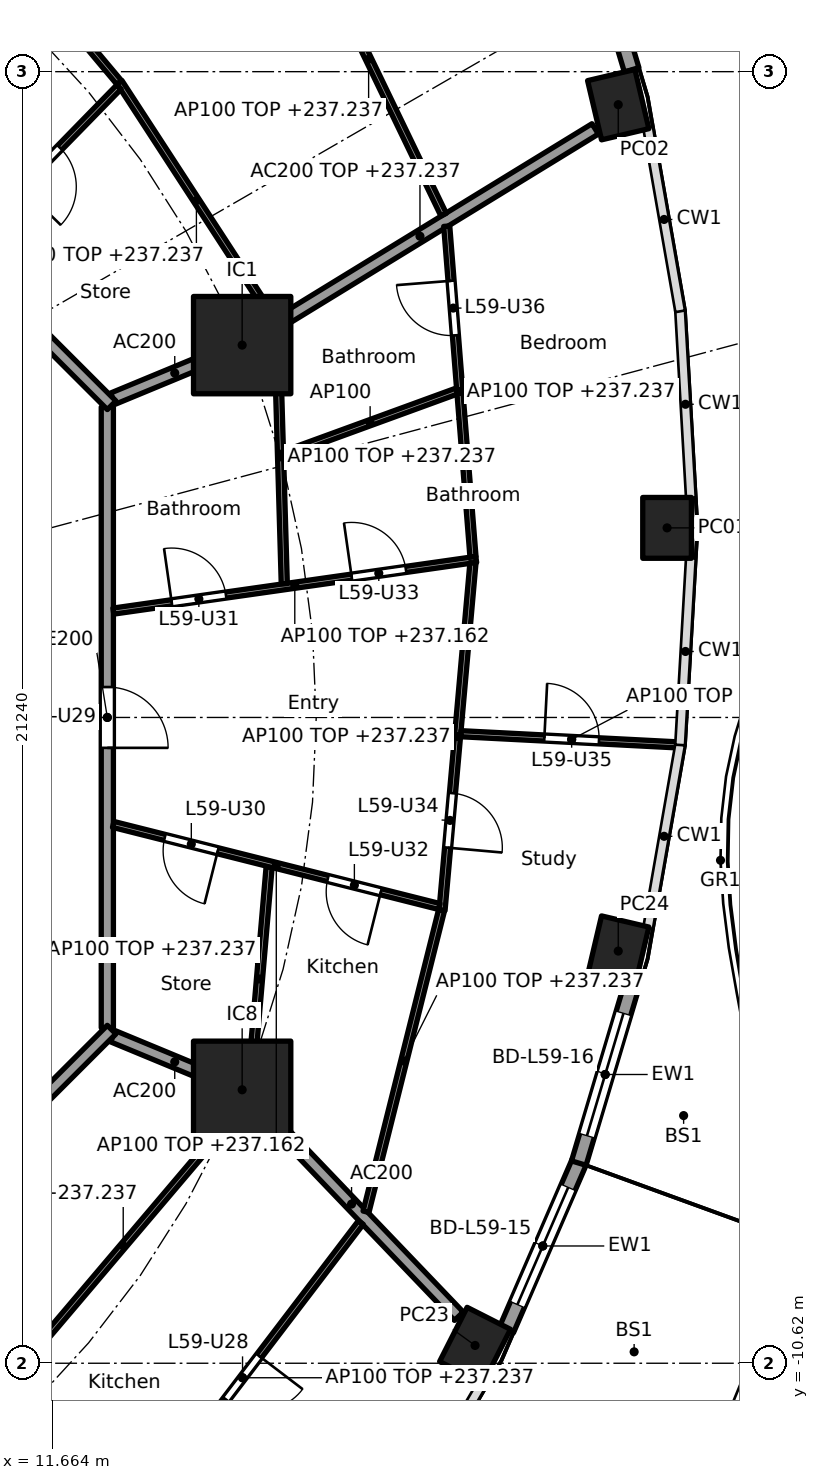
"""IFC4 building model, lengths in metres.
Left out: names, types, materials, properties, quantities, classifications, styles, units other than length and angle.
Written with IfcOpenShell. Run it as: python <this file> out.ifc"""

import sys

from ifc_helpers import new_model, si_unit, direction, frame, frame_2d, origin, origin_2d, place, context, subcontext, project, spatial, rectangle, hollow_rectangle, extrude, element, fill, save


model = new_model("IFC4")
c1 = context("Model", 3, precision=1e-05, world=origin(), true_north=direction((0.0, 1.0)))
c2 = subcontext(c1, "Body", "Model", "MODEL_VIEW")
j1 = project(units=[si_unit("LENGTHUNIT", "METRE"), si_unit("PLANEANGLEUNIT", "RADIAN")], contexts=[c1])
p1 = place(None, origin())
s1 = spatial("IfcSite", under=j1, at=p1, CompositionType="ELEMENT")
p2 = place(p1, origin())
s2 = spatial("IfcBuilding", under=s1, at=p2, CompositionType="ELEMENT")
p3 = place(p2, frame((0.0, 0.0, 234.4)))
s3 = spatial("IfcBuildingStorey", under=s2, at=p3, CompositionType="ELEMENT", Elevation=234.4)
for number, where, z_axis, x_axis in (
    (1, (21.77, 3.118, 0.0), (0.0, 0.0, 1.0), (0.0, 1.0, 0.0)),
    (2, (20.967, 10.077, 0.0), (0.0, 0.0, 1.0), (-0.229, 0.973, 0.0)),
    (3, (18.612, -10.327, 0.0), (0.0, 0.0, 1.0), (0.452, 0.892, 0.0)),
    (4, (20.967, -3.842, 0.0), (0.0, 0.0, 1.0), (0.229, 0.973, 0.0)),
):
    element("IfcColumn", number, at=place(p3, frame(where, z_axis=z_axis, x_axis=x_axis)), inside=s3, PredefinedType="COLUMN", context=c2, shape_type="SweptSolid", body=[
        extrude(hollow_rectangle(XDim=1.0, YDim=0.8, WallThickness=0.032, at=origin_2d()), origin(), (0.0, 0.0, 1.0), 3.7),
    ])
for number, where, z_axis, x_axis in (
    (5, (14.782, 6.123, 0.0), (0.0, 0.0, 1.0), (1.0, 0.0, 0.0)),
    (6, (14.782, -6.123, 0.0), (0.0, 0.0, 1.0), (1.0, 0.0, 0.0)),
):
    element("IfcColumn", number, at=place(p3, frame(where, z_axis=z_axis, x_axis=x_axis)), inside=s3, PredefinedType="COLUMN", context=c2, shape_type="SweptSolid", body=[
        extrude(rectangle(XDim=1.6, YDim=1.6, at=origin_2d()), origin(), (0.0, 0.0, 1.0), 3.7),
    ])
p4 = place(p3, frame((20.318, 13.564, 0.0), z_axis=(0.0, 0.0, 1.0), x_axis=(0.285785716255, -0.958293548128, 0.0)))
e7 = element("IfcWall", 7, at=p4, inside=s3, PredefinedType="SOLIDWALL", context=c2, shape_type="SweptSolid", body=[
    extrude(rectangle(XDim=3.04, YDim=0.25, at=frame_2d((1.52, 0.0))), origin(), (0.0, 0.0, 1.0), 3.44),
])
p5 = place(p4, frame((0.47, 0.0, 0.0)))
e8 = element("IfcOpeningElement", 8, at=p5, cuts=e7, PredefinedType="OPENING", context=c2, shape_type="SweptSolid", body=[
    extrude(rectangle(XDim=2.1, YDim=2.4, at=frame_2d((1.05, 1.2))), frame((0.0, 0.135, 0.0), z_axis=(0.0, -1.0, 0.0), x_axis=(1.0, 0.0, 0.0)), (0.0, 0.0, 1.0), 0.27),
])
p6 = place(p3, frame((20.323, -7.314, 0.0), z_axis=(0.0, 0.0, 1.0), x_axis=(-0.397586897646, -0.917564525698, 0.0)))
e9 = element("IfcWall", 9, at=p6, inside=s3, PredefinedType="SOLIDWALL", context=c2, shape_type="SweptSolid", body=[
    extrude(rectangle(XDim=3.002, YDim=0.25, at=frame_2d((1.501, 0.0))), origin(), (0.0, 0.0, 1.0), 3.44),
])
p7 = place(p6, frame((0.451, 0.0, 0.0)))
e10 = element("IfcOpeningElement", 10, at=p7, cuts=e9, PredefinedType="OPENING", context=c2, shape_type="SweptSolid", body=[
    extrude(rectangle(XDim=2.1, YDim=2.4, at=frame_2d((1.05, 1.2))), frame((0.0, 0.135, 0.0), z_axis=(0.0, -1.0, 0.0), x_axis=(1.0, 0.0, 0.0)), (0.0, 0.0, 1.0), 0.27),
])
p8 = place(p3, frame((21.187, -4.415, 0.0), z_axis=(0.0, 0.0, 1.0), x_axis=(-0.285785716255, -0.958293548128, 0.0)))
e11 = element("IfcWall", 11, at=p8, inside=s3, PredefinedType="SOLIDWALL", context=c2, shape_type="SweptSolid", body=[
    extrude(rectangle(XDim=3.04, YDim=0.25, at=frame_2d((1.52, 0.0))), origin(), (0.0, 0.0, 1.0), 3.44),
])
p9 = place(p8, frame((0.47, 0.0, 0.0)))
e12 = element("IfcOpeningElement", 12, at=p9, cuts=e11, PredefinedType="OPENING", context=c2, shape_type="SweptSolid", body=[
    extrude(rectangle(XDim=2.1, YDim=2.4, at=frame_2d((1.05, 1.2))), frame((0.0, 0.135, 0.0), z_axis=(0.0, -1.0, 0.0), x_axis=(1.0, 0.0, 0.0)), (0.0, 0.0, 1.0), 0.27),
])
p10 = place(p3, frame((12.657, 5.243, 0.0), z_axis=(0.0, 0.0, 1.0), x_axis=(0.92383017907, 0.382802560388, 0.0)))
e13 = element("IfcWall", 13, at=p10, inside=s3, PredefinedType="PARTITIONING", context=c2, shape_type="SweptSolid", body=[
    extrude(rectangle(XDim=2.2, YDim=0.2, at=frame_2d((1.1, 0.0))), origin(), (0.0, 0.0, 1.0), 3.44),
])
p11 = place(p3, frame((14.825, 6.149, 0.0), z_axis=(0.0, 0.0, 1.0), x_axis=(0.852781365284, 0.522268075824, 0.0)))
e14 = element("IfcWall", 14, at=p11, inside=s3, PredefinedType="PARTITIONING", context=c2, shape_type="SweptSolid", body=[
    extrude(rectangle(XDim=6.758, YDim=0.2, at=frame_2d((3.379, 0.0))), origin(), (0.0, 0.0, 1.0), 2.837),
])
p12 = place(p3, frame((12.657, -5.243, 0.0), z_axis=(0.0, 0.0, 1.0), x_axis=(0.923853160736, -0.382747093259, 0.0)))
e15 = element("IfcWall", 15, at=p12, inside=s3, PredefinedType="PARTITIONING", context=c2, shape_type="SweptSolid", body=[
    extrude(rectangle(XDim=2.2, YDim=0.2, at=frame_2d((1.1, 0.0))), origin(), (0.0, 0.0, 1.0), 3.44),
])
p13 = place(p3, frame((14.817, -6.159, 0.0), z_axis=(0.0, 0.0, 1.0), x_axis=(0.691437669875, -0.722436120828, 0.0)))
e16 = element("IfcWall", 16, at=p13, inside=s3, PredefinedType="PARTITIONING", context=c2, shape_type="SweptSolid", body=[
    extrude(rectangle(XDim=5.104, YDim=0.2, at=frame_2d((2.552, 0.0))), origin(), (0.0, 0.0, 1.0), 3.44),
])
p14 = place(p3, frame((12.565, -5.104, 0.0), z_axis=(0.0, 0.0, 1.0), x_axis=(0.0, 1.0, 0.0)))
e17 = element("IfcWall", 17, at=p14, inside=s3, PredefinedType="PARTITIONING", context=c2, shape_type="SweptSolid", body=[
    extrude(rectangle(XDim=10.209, YDim=0.2, at=frame_2d((5.104, 0.0))), origin(), (0.0, 0.0, 1.0), 3.44),
])
p15 = place(p14, frame((4.604, 0.0, 0.0)))
e18 = element("IfcOpeningElement", 18, at=p15, cuts=e17, PredefinedType="OPENING", context=c2, shape_type="SweptSolid", body=[
    extrude(rectangle(XDim=1.0, YDim=2.1, at=frame_2d((0.5, 1.05))), frame((0.0, 0.11, 0.0), z_axis=(0.0, -1.0, 0.0), x_axis=(1.0, 0.0, 0.0)), (0.0, 0.0, 1.0), 0.22),
])
p16 = place(p3, frame((12.635, 5.134, 0.0), z_axis=(0.0, 0.0, 1.0), x_axis=(-0.707106781187, 0.707106781187, 0.0)))
e19 = element("IfcWall", 19, at=p16, inside=s3, PredefinedType="PARTITIONING", context=c2, shape_type="SweptSolid", body=[
    extrude(rectangle(XDim=10.609, YDim=0.2, at=frame_2d((5.305, 0.0))), origin(), (0.0, 0.0, 1.0), 3.44),
])
p17 = place(p3, frame((5.275, -12.494, 0.0), z_axis=(0.0, 0.0, 1.0), x_axis=(0.707106781187, 0.707106781187, 0.0)))
e20 = element("IfcWall", 20, at=p17, inside=s3, PredefinedType="PARTITIONING", context=c2, shape_type="SweptSolid", body=[
    extrude(rectangle(XDim=10.409, YDim=0.2, at=frame_2d((5.205, 0.0))), origin(), (0.0, 0.0, 1.0), 3.44),
])
p18 = place(p17, frame((3.303, 0.0, 0.0)))
e21 = element("IfcOpeningElement", 21, at=p18, cuts=e20, PredefinedType="OPENING", context=c2, shape_type="SweptSolid", body=[
    extrude(rectangle(XDim=1.0, YDim=2.1, at=frame_2d((0.5, 1.05))), frame((0.0, 0.11, 0.0), z_axis=(0.0, -1.0, 0.0), x_axis=(1.0, 0.0, 0.0)), (0.0, 0.0, 1.0), 0.22),
])
p19 = place(p3, frame((12.664, 1.749, 0.0), z_axis=(0.0, 0.0, 1.0), x_axis=(0.990000460163, 0.141064130369, 0.0)))
e22 = element("IfcWall", 22, at=p19, inside=s3, PredefinedType="PARTITIONING", context=c2, shape_type="SweptSolid", body=[
    extrude(rectangle(XDim=6.028, YDim=0.1, at=frame_2d((3.014, 0.0))), origin(), (0.0, 0.0, 1.0), 2.762),
])
p20 = place(p19, frame((0.97, 0.0, 0.0)))
e23 = element("IfcOpeningElement", 23, at=p20, cuts=e22, PredefinedType="OPENING", context=c2, shape_type="SweptSolid", body=[
    extrude(rectangle(XDim=0.9, YDim=2.1, at=frame_2d((0.45, 1.05))), frame((0.0, 0.06, 0.0), z_axis=(0.0, -1.0, 0.0), x_axis=(1.0, 0.0, 0.0)), (0.0, 0.0, 1.0), 0.12),
])
p21 = place(p19, frame((3.959, 0.0, 0.0)))
e24 = element("IfcOpeningElement", 24, at=p21, cuts=e22, PredefinedType="OPENING", context=c2, shape_type="SweptSolid", body=[
    extrude(rectangle(XDim=0.9, YDim=2.1, at=frame_2d((0.45, 1.05))), frame((0.0, 0.06, 0.0), z_axis=(0.0, -1.0, 0.0), x_axis=(1.0, 0.0, 0.0)), (0.0, 0.0, 1.0), 0.12),
])
p22 = place(p3, frame((15.475, 2.2, 0.0), z_axis=(0.0, 0.0, 1.0), x_axis=(-0.029254623973, 0.999571991893, 0.0)))
e25 = element("IfcWall", 25, at=p22, inside=s3, PredefinedType="PARTITIONING", context=c2, shape_type="SweptSolid", body=[
    extrude(rectangle(XDim=4.173, YDim=0.1, at=frame_2d((2.086, 0.0))), origin(), (0.0, 0.0, 1.0), 2.837),
])
p23 = place(p3, frame((18.578, 2.642, 0.0), z_axis=(0.0, 0.0, 1.0), x_axis=(-0.079188322924, 0.996859673932, 0.0)))
e26 = element("IfcWall", 26, at=p23, inside=s3, PredefinedType="PARTITIONING", context=c2, shape_type="SweptSolid", body=[
    extrude(rectangle(XDim=5.454, YDim=0.1, at=frame_2d((2.727, 0.0))), origin(), (0.0, 0.0, 1.0), 2.837),
])
p24 = place(p23, frame((3.653, 0.0, 0.0)))
e27 = element("IfcOpeningElement", 27, at=p24, cuts=e26, PredefinedType="OPENING", context=c2, shape_type="SweptSolid", body=[
    extrude(rectangle(XDim=0.9, YDim=2.1, at=frame_2d((0.45, 1.05))), frame((0.0, 0.06, 0.0), z_axis=(0.0, -1.0, 0.0), x_axis=(1.0, 0.0, 0.0)), (0.0, 0.0, 1.0), 0.12),
])
p25 = place(p3, frame((18.578, 2.542, 0.0), z_axis=(0.0, 0.0, 1.0), x_axis=(-0.088651453697, -0.996062708748, 0.0)))
e28 = element("IfcWall", 28, at=p25, inside=s3, PredefinedType="PARTITIONING", context=c2, shape_type="SweptSolid", body=[
    extrude(rectangle(XDim=5.737, YDim=0.1, at=frame_2d((2.868, 0.0))), origin(), (0.0, 0.0, 1.0), 2.837),
])
p26 = place(p25, frame((3.802, 0.0, 0.0)))
e29 = element("IfcOpeningElement", 29, at=p26, cuts=e28, PredefinedType="OPENING", context=c2, shape_type="SweptSolid", body=[
    extrude(rectangle(XDim=0.9, YDim=2.1, at=frame_2d((0.45, 1.05))), frame((0.0, 0.06, 0.0), z_axis=(0.0, -1.0, 0.0), x_axis=(1.0, 0.0, 0.0)), (0.0, 0.0, 1.0), 0.12),
])
p27 = place(p3, frame((15.46, 4.327, 0.0), z_axis=(0.0, 0.0, 1.0), x_axis=(0.939452643938, 0.342678755977, 0.0)))
e30 = element("IfcWall", 30, at=p27, inside=s3, PredefinedType="PARTITIONING", context=c2, shape_type="SweptSolid", body=[
    extrude(rectangle(XDim=3.037, YDim=0.1, at=frame_2d((1.519, 0.0))), origin(), (0.0, 0.0, 1.0), 3.44),
])
p28 = place(p3, frame((15.295, 6.554, 0.0), z_axis=(0.0, 0.0, 1.0), x_axis=(-0.545186120363, 0.838315032767, 0.0)))
e31 = element("IfcWall", 31, at=p28, inside=s3, PredefinedType="PARTITIONING", context=c2, shape_type="SweptSolid", body=[
    extrude(rectangle(XDim=4.643, YDim=0.1, at=frame_2d((2.321, 0.0))), origin(), (0.0, 0.0, 1.0), 2.837),
])
p29 = place(p3, frame((18.095, 8.269, 0.0), z_axis=(0.0, 0.0, 1.0), x_axis=(-0.434640773561, 0.900603907363, 0.0)))
e32 = element("IfcWall", 32, at=p29, inside=s3, PredefinedType="PARTITIONING", context=c2, shape_type="SweptSolid", body=[
    extrude(rectangle(XDim=5.674, YDim=0.1, at=frame_2d((2.837, 0.0))), origin(), (0.0, 0.0, 1.0), 2.837),
])
p30 = place(p3, frame((10.181, 7.729, 0.0), z_axis=(0.0, 0.0, 1.0), x_axis=(0.69841402561, 0.71569396311, 0.0)))
e33 = element("IfcWall", 33, at=p30, inside=s3, PredefinedType="PARTITIONING", context=c2, shape_type="SweptSolid", body=[
    extrude(rectangle(XDim=3.688, YDim=0.1, at=frame_2d((1.844, 0.0))), origin(), (0.0, 0.0, 1.0), 2.762),
])
p31 = place(p30, frame((1.394, 0.0, 0.0)))
e34 = element("IfcOpeningElement", 34, at=p31, cuts=e33, PredefinedType="OPENING", context=c2, shape_type="SweptSolid", body=[
    extrude(rectangle(XDim=0.9, YDim=2.1, at=frame_2d((0.45, 1.05))), frame((0.0, 0.06, 0.0), z_axis=(0.0, -1.0, 0.0), x_axis=(1.0, 0.0, 0.0)), (0.0, 0.0, 1.0), 0.12),
])
p32 = place(p3, frame((12.759, 10.443, 0.0), z_axis=(0.0, 0.0, 1.0), x_axis=(-0.642225196965, 0.766516011825, 0.0)))
e35 = element("IfcWall", 35, at=p32, inside=s3, PredefinedType="PARTITIONING", context=c2, shape_type="SweptSolid", body=[
    extrude(rectangle(XDim=4.361, YDim=0.1, at=frame_2d((2.18, 0.0))), origin(), (0.0, 0.0, 1.0), 2.837),
])
p33 = place(p3, frame((8.95, -8.96, 0.0), z_axis=(0.0, 0.0, 1.0), x_axis=(0.652102165991, -0.758131100213, 0.0)))
e36 = element("IfcWall", 36, at=p33, inside=s3, PredefinedType="PARTITIONING", context=c2, shape_type="SweptSolid", body=[
    extrude(rectangle(XDim=8.568, YDim=0.1, at=frame_2d((4.284, 0.0))), origin(), (0.0, 0.0, 1.0), 2.762),
])
p34 = place(p33, frame((0.957, 0.0, 0.0)))
e37 = element("IfcOpeningElement", 37, at=p34, cuts=e36, PredefinedType="OPENING", context=c2, shape_type="SweptSolid", body=[
    extrude(rectangle(XDim=0.9, YDim=2.1, at=frame_2d((0.45, 1.05))), frame((0.0, 0.06, 0.0), z_axis=(0.0, -1.0, 0.0), x_axis=(1.0, 0.0, 0.0)), (0.0, 0.0, 1.0), 0.12),
])
p35 = place(p33, frame((3.919, 0.0, 0.0)))
e38 = element("IfcOpeningElement", 38, at=p35, cuts=e36, PredefinedType="OPENING", context=c2, shape_type="SweptSolid", body=[
    extrude(rectangle(XDim=0.9, YDim=2.1, at=frame_2d((0.45, 1.05))), frame((0.0, 0.06, 0.0), z_axis=(0.0, -1.0, 0.0), x_axis=(1.0, 0.0, 0.0)), (0.0, 0.0, 1.0), 0.12),
])
p36 = place(p3, frame((10.818, -11.056, 0.0), z_axis=(0.0, 0.0, 1.0), x_axis=(0.646981604878, 0.762505608471, 0.0)))
e39 = element("IfcWall", 39, at=p36, inside=s3, PredefinedType="PARTITIONING", context=c2, shape_type="SweptSolid", body=[
    extrude(rectangle(XDim=6.209, YDim=0.1, at=frame_2d((3.104, 0.0))), origin(), (0.0, 0.0, 1.0), 2.837),
])
p37 = place(p3, frame((12.843, -13.411, 0.0), z_axis=(0.0, 0.0, 1.0), x_axis=(0.606128002625, 0.795367112995, 0.0)))
e40 = element("IfcWall", 40, at=p37, inside=s3, PredefinedType="PARTITIONING", context=c2, shape_type="SweptSolid", body=[
    extrude(rectangle(XDim=6.42, YDim=0.1, at=frame_2d((3.21, 0.0))), origin(), (0.0, 0.0, 1.0), 2.837),
])
p38 = place(p37, frame((2.76, 0.0, 0.0)))
e41 = element("IfcOpeningElement", 41, at=p38, cuts=e40, PredefinedType="OPENING", context=c2, shape_type="SweptSolid", body=[
    extrude(rectangle(XDim=0.9, YDim=2.1, at=frame_2d((0.45, 1.05))), frame((0.0, 0.06, 0.0), z_axis=(0.0, -1.0, 0.0), x_axis=(1.0, 0.0, 0.0)), (0.0, 0.0, 1.0), 0.12),
])
p39 = place(p3, frame((14.908, -6.146, 0.0), z_axis=(0.0, 0.0, 1.0), x_axis=(0.085881574106, 0.996305352404, 0.0)))
e42 = element("IfcWall", 42, at=p39, inside=s3, PredefinedType="PARTITIONING", context=c2, shape_type="SweptSolid", body=[
    extrude(rectangle(XDim=3.704, YDim=0.1, at=frame_2d((1.852, 0.0))), origin(), (0.0, 0.0, 1.0), 2.837),
])
p40 = place(p3, frame((16.819, -8.129, 0.0), z_axis=(0.0, 0.0, 1.0), x_axis=(0.243041266705, 0.970015949703, 0.0)))
e43 = element("IfcWall", 43, at=p40, inside=s3, PredefinedType="PARTITIONING", context=c2, shape_type="SweptSolid", body=[
    extrude(rectangle(XDim=5.112, YDim=0.1, at=frame_2d((2.556, 0.0))), origin(), (0.0, 0.0, 1.0), 2.837),
])
p41 = place(p3, frame((12.662, -1.759, 0.0), z_axis=(0.0, 0.0, 1.0), x_axis=(0.969746519828, -0.24411408661, 0.0)))
e44 = element("IfcWall", 44, at=p41, inside=s3, PredefinedType="PARTITIONING", context=c2, shape_type="SweptSolid", body=[
    extrude(rectangle(XDim=5.531, YDim=0.1, at=frame_2d((2.765, 0.0))), origin(), (0.0, 0.0, 1.0), 2.762),
])
p42 = place(p41, frame((0.874, 0.0, 0.0)))
e45 = element("IfcOpeningElement", 45, at=p42, cuts=e44, PredefinedType="OPENING", context=c2, shape_type="SweptSolid", body=[
    extrude(rectangle(XDim=0.9, YDim=2.1, at=frame_2d((0.45, 1.05))), frame((0.0, 0.06, 0.0), z_axis=(0.0, -1.0, 0.0), x_axis=(1.0, 0.0, 0.0)), (0.0, 0.0, 1.0), 0.12),
])
p43 = place(p41, frame((3.64, 0.0, 0.0)))
e46 = element("IfcOpeningElement", 46, at=p43, cuts=e44, PredefinedType="OPENING", context=c2, shape_type="SweptSolid", body=[
    extrude(rectangle(XDim=0.9, YDim=2.1, at=frame_2d((0.45, 1.05))), frame((0.0, 0.06, 0.0), z_axis=(0.0, -1.0, 0.0), x_axis=(1.0, 0.0, 0.0)), (0.0, 0.0, 1.0), 0.12),
])
p44 = place(p3, frame((18.378, -0.267, 0.0), z_axis=(0.0, 0.0, 1.0), x_axis=(0.998670331817, -0.051551608585, 0.0)))
e47 = element("IfcWall", 47, at=p44, inside=s3, PredefinedType="PARTITIONING", context=c2, shape_type="SweptSolid", body=[
    extrude(rectangle(XDim=3.651, YDim=0.1, at=frame_2d((1.826, 0.0))), origin(), (0.0, 0.0, 1.0), 2.983),
])
p45 = place(p44, frame((1.375, 0.0, 0.0)))
e48 = element("IfcOpeningElement", 48, at=p45, cuts=e47, PredefinedType="OPENING", context=c2, shape_type="SweptSolid", body=[
    extrude(rectangle(XDim=0.9, YDim=2.1, at=frame_2d((0.45, 1.05))), frame((0.0, 0.06, 0.0), z_axis=(0.0, -1.0, 0.0), x_axis=(1.0, 0.0, 0.0)), (0.0, 0.0, 1.0), 0.12),
])
p46 = place(p7, origin())
e49 = element("IfcDoor", 49, at=p46, inside=s3, OperationType="SLIDING_TO_LEFT", PredefinedType="DOOR", context=c2, shape_type="SweptSolid", body=[
    extrude(rectangle(XDim=2.1, YDim=2.4, at=frame_2d((1.05, 1.2))), frame((0.0, 0.025, 0.0), z_axis=(0.0, -1.0, 0.0), x_axis=(1.0, 0.0, 0.0)), (0.0, 0.0, 1.0), 0.05),
])
fill(e10, e49)
p47 = place(p9, origin())
e50 = element("IfcDoor", 50, at=p47, inside=s3, OperationType="SLIDING_TO_LEFT", PredefinedType="DOOR", context=c2, shape_type="SweptSolid", body=[
    extrude(rectangle(XDim=2.1, YDim=2.4, at=frame_2d((1.05, 1.2))), frame((0.0, 0.025, 0.0), z_axis=(0.0, -1.0, 0.0), x_axis=(1.0, 0.0, 0.0)), (0.0, 0.0, 1.0), 0.05),
])
fill(e12, e50)
p48 = place(p38, frame((0.9, 0.0, 0.0), x_axis=(-1.0, 0.0, 0.0)))
e51 = element("IfcDoor", 51, at=p48, inside=s3, OperationType="SINGLE_SWING_LEFT", PredefinedType="DOOR", context=c2, shape_type="SweptSolid", body=[
    extrude(rectangle(XDim=0.9, YDim=2.1, at=frame_2d((0.45, 1.05))), frame((0.0, 0.025, 0.0), z_axis=(0.0, -1.0, 0.0), x_axis=(1.0, 0.0, 0.0)), (0.0, 0.0, 1.0), 0.05),
])
fill(e41, e51)
p49 = place(p15, frame((1.0, 0.0, 0.0), x_axis=(-1.0, 0.0, 0.0)))
e52 = element("IfcDoor", 52, at=p49, inside=s3, OperationType="SINGLE_SWING_RIGHT", PredefinedType="DOOR", context=c2, shape_type="SweptSolid", body=[
    extrude(rectangle(XDim=1.0, YDim=2.1, at=frame_2d((0.5, 1.05))), frame((0.0, 0.025, 0.0), z_axis=(0.0, -1.0, 0.0), x_axis=(1.0, 0.0, 0.0)), (0.0, 0.0, 1.0), 0.05),
])
fill(e18, e52)
p50 = place(p42, frame((0.9, 0.0, 0.0), x_axis=(-1.0, 0.0, 0.0)))
e53 = element("IfcDoor", 53, at=p50, inside=s3, OperationType="SINGLE_SWING_LEFT", PredefinedType="DOOR", context=c2, shape_type="SweptSolid", body=[
    extrude(rectangle(XDim=0.9, YDim=2.1, at=frame_2d((0.45, 1.05))), frame((0.0, 0.025, 0.0), z_axis=(0.0, -1.0, 0.0), x_axis=(1.0, 0.0, 0.0)), (0.0, 0.0, 1.0), 0.05),
])
fill(e45, e53)
p51 = place(p20, origin())
e54 = element("IfcDoor", 54, at=p51, inside=s3, OperationType="SINGLE_SWING_LEFT", PredefinedType="DOOR", context=c2, shape_type="SweptSolid", body=[
    extrude(rectangle(XDim=0.9, YDim=2.1, at=frame_2d((0.45, 1.05))), frame((0.0, 0.025, 0.0), z_axis=(0.0, -1.0, 0.0), x_axis=(1.0, 0.0, 0.0)), (0.0, 0.0, 1.0), 0.05),
])
fill(e23, e54)
p52 = place(p43, frame((0.9, 0.0, 0.0), x_axis=(-1.0, 0.0, 0.0)))
e55 = element("IfcDoor", 55, at=p52, inside=s3, OperationType="SINGLE_SWING_LEFT", PredefinedType="DOOR", context=c2, shape_type="SweptSolid", body=[
    extrude(rectangle(XDim=0.9, YDim=2.1, at=frame_2d((0.45, 1.05))), frame((0.0, 0.025, 0.0), z_axis=(0.0, -1.0, 0.0), x_axis=(1.0, 0.0, 0.0)), (0.0, 0.0, 1.0), 0.05),
])
fill(e46, e55)
p53 = place(p21, origin())
e56 = element("IfcDoor", 56, at=p53, inside=s3, OperationType="SINGLE_SWING_LEFT", PredefinedType="DOOR", context=c2, shape_type="SweptSolid", body=[
    extrude(rectangle(XDim=0.9, YDim=2.1, at=frame_2d((0.45, 1.05))), frame((0.0, 0.025, 0.0), z_axis=(0.0, -1.0, 0.0), x_axis=(1.0, 0.0, 0.0)), (0.0, 0.0, 1.0), 0.05),
])
fill(e24, e56)
p54 = place(p26, origin())
e57 = element("IfcDoor", 57, at=p54, inside=s3, OperationType="SINGLE_SWING_RIGHT", PredefinedType="DOOR", context=c2, shape_type="SweptSolid", body=[
    extrude(rectangle(XDim=0.9, YDim=2.1, at=frame_2d((0.45, 1.05))), frame((0.0, 0.025, 0.0), z_axis=(0.0, -1.0, 0.0), x_axis=(1.0, 0.0, 0.0)), (0.0, 0.0, 1.0), 0.05),
])
fill(e29, e57)
p55 = place(p45, origin())
e58 = element("IfcDoor", 58, at=p55, inside=s3, OperationType="SINGLE_SWING_LEFT", PredefinedType="DOOR", context=c2, shape_type="SweptSolid", body=[
    extrude(rectangle(XDim=0.9, YDim=2.1, at=frame_2d((0.45, 1.05))), frame((0.0, 0.025, 0.0), z_axis=(0.0, -1.0, 0.0), x_axis=(1.0, 0.0, 0.0)), (0.0, 0.0, 1.0), 0.05),
])
fill(e48, e58)
p56 = place(p24, origin())
e59 = element("IfcDoor", 59, at=p56, inside=s3, OperationType="SINGLE_SWING_RIGHT", PredefinedType="DOOR", context=c2, shape_type="SweptSolid", body=[
    extrude(rectangle(XDim=0.9, YDim=2.1, at=frame_2d((0.45, 1.05))), frame((0.0, 0.025, 0.0), z_axis=(0.0, -1.0, 0.0), x_axis=(1.0, 0.0, 0.0)), (0.0, 0.0, 1.0), 0.05),
])
fill(e27, e59)
p57 = place(p31, frame((0.9, 0.0, 0.0), x_axis=(-1.0, 0.0, 0.0)))
e60 = element("IfcDoor", 60, at=p57, inside=s3, OperationType="SINGLE_SWING_RIGHT", PredefinedType="DOOR", context=c2, shape_type="SweptSolid", body=[
    extrude(rectangle(XDim=0.9, YDim=2.1, at=frame_2d((0.45, 1.05))), frame((0.0, 0.025, 0.0), z_axis=(0.0, -1.0, 0.0), x_axis=(1.0, 0.0, 0.0)), (0.0, 0.0, 1.0), 0.05),
])
fill(e34, e60)
save(model, sys.argv[1])
